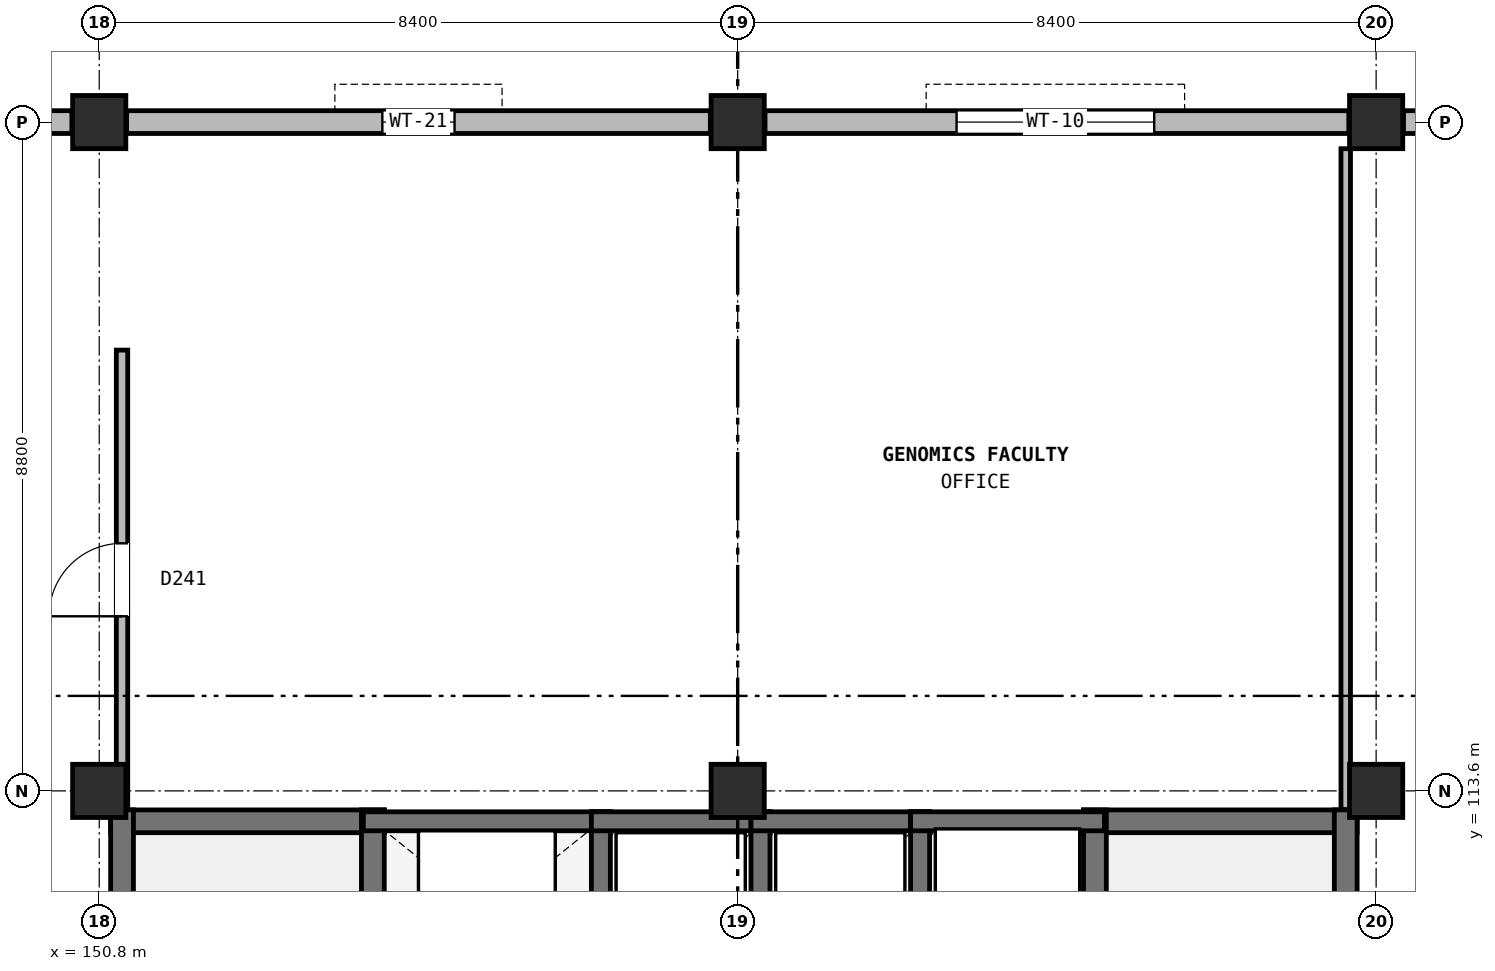
"""IFC4 building model, lengths in metres.
Left out: names, types, materials, properties, quantities, classifications, styles, units other than length and angle.
Written with IfcOpenShell. Run it as: python <this file> out.ifc"""

import sys

from ifc_helpers import new_model, si_unit, direction, frame, frame_2d, origin, origin_2d, place, context, subcontext, project, spatial, rectangle, extrude, element, fill, save


model = new_model("IFC4")
c1 = context("Model", 3, precision=1e-05, world=origin(), true_north=direction((0.0, 1.0)))
c2 = subcontext(c1, "Body", "Model", "MODEL_VIEW")
j1 = project(units=[si_unit("LENGTHUNIT", "METRE"), si_unit("PLANEANGLEUNIT", "RADIAN")], contexts=[c1])
p1 = place(None, origin())
s1 = spatial("IfcSite", under=j1, at=p1, CompositionType="ELEMENT")
p2 = place(p1, origin())
s2 = spatial("IfcBuilding", under=s1, at=p2, CompositionType="ELEMENT")
p3 = place(p2, frame((0.0, 0.0, 36.8)))
s3 = spatial("IfcBuildingStorey", under=s2, at=p3, CompositionType="ELEMENT", Elevation=36.8)
for number, where, z_axis, x_axis in (
    (1, (150.8, 113.6, 0.0), (0.0, 0.0, 1.0), (1.0, 0.0, 0.0)),
    (2, (150.8, 122.4, 0.0), (0.0, 0.0, 1.0), (1.0, 0.0, 0.0)),
    (3, (159.2, 113.6, 0.0), (0.0, 0.0, 1.0), (1.0, 0.0, 0.0)),
    (4, (159.2, 122.4, 0.0), (0.0, 0.0, 1.0), (1.0, 0.0, 0.0)),
    (5, (167.6, 113.6, 0.0), (0.0, 0.0, 1.0), (1.0, 0.0, 0.0)),
    (6, (167.6, 122.4, 0.0), (0.0, 0.0, 1.0), (1.0, 0.0, 0.0)),
):
    element("IfcColumn", number, at=place(p3, frame(where, z_axis=z_axis, x_axis=x_axis)), inside=s3, PredefinedType="COLUMN", context=c2, shape_type="SweptSolid", body=[
        extrude(rectangle(XDim=0.7, YDim=0.7, at=origin_2d()), origin(), (0.0, 0.0, 1.0), 3.8),
    ])
p4 = place(p3, frame((175.64, 122.4, 0.0), z_axis=(0.0, 0.0, 1.0), x_axis=(-1.0, 0.0, 0.0)))
e7 = element("IfcWall", 7, at=p4, inside=s3, PredefinedType="SOLIDWALL", context=c2, shape_type="SweptSolid", body=[
    extrude(rectangle(XDim=7.68, YDim=0.3, at=frame_2d((3.84, 0.0))), origin(), (0.0, 0.0, 1.0), 3.05),
])
p5 = place(p4, frame((0.72, 0.0, 0.9)))
e8 = element("IfcOpeningElement", 8, at=p5, cuts=e7, PredefinedType="OPENING", context=c2, shape_type="SweptSolid", body=[
    extrude(rectangle(XDim=2.6, YDim=2.0, at=frame_2d((1.3, 1.0))), frame((0.0, 0.16, 0.0), z_axis=(0.0, -1.0, 0.0), x_axis=(1.0, 0.0, 0.0)), (0.0, 0.0, 1.0), 0.32),
])
p6 = place(p3, frame((167.24, 122.4, 0.0), z_axis=(0.0, 0.0, 1.0), x_axis=(-1.0, 0.0, 0.0)))
e9 = element("IfcWall", 9, at=p6, inside=s3, PredefinedType="SOLIDWALL", context=c2, shape_type="SweptSolid", body=[
    extrude(rectangle(XDim=7.68, YDim=0.3, at=frame_2d((3.84, 0.0))), origin(), (0.0, 0.0, 1.0), 3.05),
])
p7 = place(p6, frame((2.56, 0.0, 0.9)))
e10 = element("IfcOpeningElement", 10, at=p7, cuts=e9, PredefinedType="OPENING", context=c2, shape_type="SweptSolid", body=[
    extrude(rectangle(XDim=2.6, YDim=2.0, at=frame_2d((1.3, 1.0))), frame((0.0, 0.16, 0.0), z_axis=(0.0, -1.0, 0.0), x_axis=(1.0, 0.0, 0.0)), (0.0, 0.0, 1.0), 0.32),
])
p8 = place(p3, frame((158.84, 122.4, 0.0), z_axis=(0.0, 0.0, 1.0), x_axis=(-1.0, 0.0, 0.0)))
e11 = element("IfcWall", 11, at=p8, inside=s3, PredefinedType="SOLIDWALL", context=c2, shape_type="SweptSolid", body=[
    extrude(rectangle(XDim=7.68, YDim=0.3, at=frame_2d((3.84, 0.0))), origin(), (0.0, 0.0, 1.0), 3.05),
])
p9 = place(p8, frame((3.365, 0.0, 0.9)))
e12 = element("IfcOpeningElement", 12, at=p9, cuts=e11, PredefinedType="OPENING", context=c2, shape_type="SweptSolid", body=[
    extrude(rectangle(XDim=0.95, YDim=1.6, at=frame_2d((0.475, 0.8))), frame((0.0, 0.16, 0.0), z_axis=(0.0, -1.0, 0.0), x_axis=(1.0, 0.0, 0.0)), (0.0, 0.0, 1.0), 0.32),
])
p10 = place(p3, frame((150.44, 122.4, 0.0), z_axis=(0.0, 0.0, 1.0), x_axis=(-1.0, 0.0, 0.0)))
e13 = element("IfcWall", 13, at=p10, inside=s3, PredefinedType="SOLIDWALL", context=c2, shape_type="SweptSolid", body=[
    extrude(rectangle(XDim=7.68, YDim=0.3, at=frame_2d((3.84, 0.0))), origin(), (0.0, 0.0, 1.0), 3.05),
])
p11 = place(p10, frame((3.29, 0.0, 0.9)))
e14 = element("IfcOpeningElement", 14, at=p11, cuts=e13, PredefinedType="OPENING", context=c2, shape_type="SweptSolid", body=[
    extrude(rectangle(XDim=1.1, YDim=1.65, at=frame_2d((0.55, 0.825))), frame((0.0, 0.16, 0.0), z_axis=(0.0, -1.0, 0.0), x_axis=(1.0, 0.0, 0.0)), (0.0, 0.0, 1.0), 0.32),
])
p12 = place(p3, frame((150.95, 113.2, 0.0), z_axis=(0.0, 0.0, 1.0), x_axis=(1.0, 0.0, 0.0)))
e15 = element("IfcWall", 15, at=p12, inside=s3, PredefinedType="SHEAR", context=c2, shape_type="SweptSolid", body=[
    extrude(rectangle(XDim=3.6, YDim=0.3, at=frame_2d((1.8, 0.0))), origin(), (0.0, 0.0, 1.0), 3.8),
])
p13 = place(p3, frame((151.1, 105.05, 0.0), z_axis=(0.0, 0.0, 1.0), x_axis=(0.0, 1.0, 0.0)))
e16 = element("IfcWall", 16, at=p13, inside=s3, PredefinedType="SHEAR", context=c2, shape_type="SweptSolid", body=[
    extrude(rectangle(XDim=8.3, YDim=0.3, at=frame_2d((4.15, 0.0))), origin(), (0.0, 0.0, 1.0), 3.8),
])
p14 = place(p3, frame((154.4, 105.05, 0.0), z_axis=(0.0, 0.0, 1.0), x_axis=(0.0, 1.0, 0.0)))
e17 = element("IfcWall", 17, at=p14, inside=s3, PredefinedType="SHEAR", context=c2, shape_type="SweptSolid", body=[
    extrude(rectangle(XDim=8.3, YDim=0.3, at=frame_2d((4.15, 0.0))), origin(), (0.0, 0.0, 1.0), 3.8),
])
p15 = place(p14, frame((0.45, 0.0, 0.0)))
e18 = element("IfcOpeningElement", 18, at=p15, cuts=e17, PredefinedType="OPENING", context=c2, shape_type="SweptSolid", body=[
    extrude(rectangle(XDim=1.1, YDim=2.2, at=frame_2d((0.55, 1.1))), frame((0.0, 0.16, 0.0), z_axis=(0.0, -1.0, 0.0), x_axis=(1.0, 0.0, 0.0)), (0.0, 0.0, 1.0), 0.32),
])
p16 = place(p3, frame((163.75, 113.2, 0.0), z_axis=(0.0, 0.0, 1.0), x_axis=(1.0, 0.0, 0.0)))
e19 = element("IfcWall", 19, at=p16, inside=s3, PredefinedType="SHEAR", context=c2, shape_type="SweptSolid", body=[
    extrude(rectangle(XDim=3.6, YDim=0.3, at=frame_2d((1.8, 0.0))), origin(), (0.0, 0.0, 1.0), 3.8),
])
for number, where, z_axis, x_axis in (
    (20, (163.9, 105.05, 0.0), (0.0, 0.0, 1.0), (0.0, 1.0, 0.0)),
    (21, (167.2, 105.05, 0.0), (0.0, 0.0, 1.0), (0.0, 1.0, 0.0)),
):
    element("IfcWall", number, at=place(p3, frame(where, z_axis=z_axis, x_axis=x_axis)), inside=s3, PredefinedType="SHEAR", context=c2, shape_type="SweptSolid", body=[
        extrude(rectangle(XDim=8.3, YDim=0.3, at=frame_2d((4.15, 0.0))), origin(), (0.0, 0.0, 1.0), 3.8),
    ])
p17 = place(p3, frame((154.275, 113.2, 0.0), z_axis=(0.0, 0.0, 1.0), x_axis=(1.0, 0.0, 0.0)))
e22 = element("IfcWall", 22, at=p17, inside=s3, PredefinedType="SOLIDWALL", context=c2, shape_type="SweptSolid", body=[
    extrude(rectangle(XDim=3.25, YDim=0.25, at=frame_2d((1.625, 0.0))), origin(), (0.0, 0.0, 1.0), 3.48),
])
p18 = place(p3, frame((157.4, 110.675, 0.0), z_axis=(0.0, 0.0, 1.0), x_axis=(0.0, 1.0, 0.0)))
e23 = element("IfcWall", 23, at=p18, inside=s3, PredefinedType="SOLIDWALL", context=c2, shape_type="SweptSolid", body=[
    extrude(rectangle(XDim=2.65, YDim=0.25, at=frame_2d((1.325, 0.0))), origin(), (0.0, 0.0, 1.0), 3.48),
])
p19 = place(p3, frame((157.275, 113.2, 0.0), z_axis=(0.0, 0.0, 1.0), x_axis=(1.0, 0.0, 0.0)))
e24 = element("IfcWall", 24, at=p19, inside=s3, PredefinedType="SOLIDWALL", context=c2, shape_type="SweptSolid", body=[
    extrude(rectangle(XDim=2.35, YDim=0.25, at=frame_2d((1.175, 0.0))), origin(), (0.0, 0.0, 1.0), 3.48),
])
p20 = place(p3, frame((159.5, 110.675, 0.0), z_axis=(0.0, 0.0, 1.0), x_axis=(0.0, 1.0, 0.0)))
e25 = element("IfcWall", 25, at=p20, inside=s3, PredefinedType="SOLIDWALL", context=c2, shape_type="SweptSolid", body=[
    extrude(rectangle(XDim=2.65, YDim=0.25, at=frame_2d((1.325, 0.0))), origin(), (0.0, 0.0, 1.0), 3.48),
])
p21 = place(p3, frame((159.375, 113.2, 0.0), z_axis=(0.0, 0.0, 1.0), x_axis=(1.0, 0.0, 0.0)))
e26 = element("IfcWall", 26, at=p21, inside=s3, PredefinedType="SOLIDWALL", context=c2, shape_type="SweptSolid", body=[
    extrude(rectangle(XDim=2.35, YDim=0.25, at=frame_2d((1.175, 0.0))), origin(), (0.0, 0.0, 1.0), 3.48),
])
p22 = place(p3, frame((161.6, 110.675, 0.0), z_axis=(0.0, 0.0, 1.0), x_axis=(0.0, 1.0, 0.0)))
e27 = element("IfcWall", 27, at=p22, inside=s3, PredefinedType="SOLIDWALL", context=c2, shape_type="SweptSolid", body=[
    extrude(rectangle(XDim=2.65, YDim=0.25, at=frame_2d((1.325, 0.0))), origin(), (0.0, 0.0, 1.0), 3.48),
])
p23 = place(p3, frame((161.475, 113.2, 0.0), z_axis=(0.0, 0.0, 1.0), x_axis=(1.0, 0.0, 0.0)))
e28 = element("IfcWall", 28, at=p23, inside=s3, PredefinedType="SOLIDWALL", context=c2, shape_type="SweptSolid", body=[
    extrude(rectangle(XDim=2.55, YDim=0.25, at=frame_2d((1.275, 0.0))), origin(), (0.0, 0.0, 1.0), 3.48),
])
p24 = place(p3, frame((151.1, 113.355, 0.0), z_axis=(0.0, 0.0, 1.0), x_axis=(0.0, 1.0, 0.0)))
e29 = element("IfcWall", 29, at=p24, inside=s3, PredefinedType="PARTITIONING", context=c2, shape_type="SweptSolid", body=[
    extrude(rectangle(XDim=6.045, YDim=0.15, at=frame_2d((3.022, 0.0))), origin(), (0.0, 0.0, 1.0), 3.045),
])
p25 = place(p24, frame((2.542, 0.0, 0.0)))
e30 = element("IfcOpeningElement", 30, at=p25, cuts=e29, PredefinedType="OPENING", context=c2, shape_type="SweptSolid", body=[
    extrude(rectangle(XDim=0.96, YDim=2.14, at=frame_2d((0.48, 1.07))), frame((0.0, 0.085, 0.0), z_axis=(0.0, -1.0, 0.0), x_axis=(1.0, 0.0, 0.0)), (0.0, 0.0, 1.0), 0.17),
])
p26 = place(p3, frame((167.2, 113.355, 0.0), z_axis=(0.0, 0.0, 1.0), x_axis=(0.0, 1.0, 0.0)))
e31 = element("IfcWall", 31, at=p26, inside=s3, PredefinedType="PARTITIONING", context=c2, shape_type="SweptSolid", body=[
    extrude(rectangle(XDim=8.695, YDim=0.125, at=frame_2d((4.348, 0.0))), origin(), (0.0, 0.0, 1.0), 3.045),
])
p27 = place(p7, origin())
e32 = element("IfcWindow", 32, at=p27, inside=s3, PartitioningType="SINGLE_PANEL", PredefinedType="WINDOW", context=c2, shape_type="SweptSolid", body=[
    extrude(rectangle(XDim=2.6, YDim=2.0, at=frame_2d((1.3, 1.0))), frame((0.0, 0.03, 0.0), z_axis=(0.0, -1.0, 0.0), x_axis=(1.0, 0.0, 0.0)), (0.0, 0.0, 1.0), 0.06),
])
fill(e10, e32)
p28 = place(p9, origin())
e33 = element("IfcWindow", 33, at=p28, inside=s3, PartitioningType="SINGLE_PANEL", PredefinedType="WINDOW", context=c2, shape_type="SweptSolid", body=[
    extrude(rectangle(XDim=0.95, YDim=1.6, at=frame_2d((0.475, 0.8))), frame((0.0, 0.03, 0.0), z_axis=(0.0, -1.0, 0.0), x_axis=(1.0, 0.0, 0.0)), (0.0, 0.0, 1.0), 0.06),
])
fill(e12, e33)
p29 = place(p25, origin())
e34 = element("IfcDoor", 34, at=p29, inside=s3, OperationType="SINGLE_SWING_LEFT", PredefinedType="DOOR", context=c2, shape_type="SweptSolid", body=[
    extrude(rectangle(XDim=0.96, YDim=2.14, at=frame_2d((0.48, 1.07))), frame((0.0, 0.025, 0.0), z_axis=(0.0, -1.0, 0.0), x_axis=(1.0, 0.0, 0.0)), (0.0, 0.0, 1.0), 0.05),
])
fill(e30, e34)
save(model, sys.argv[1])
